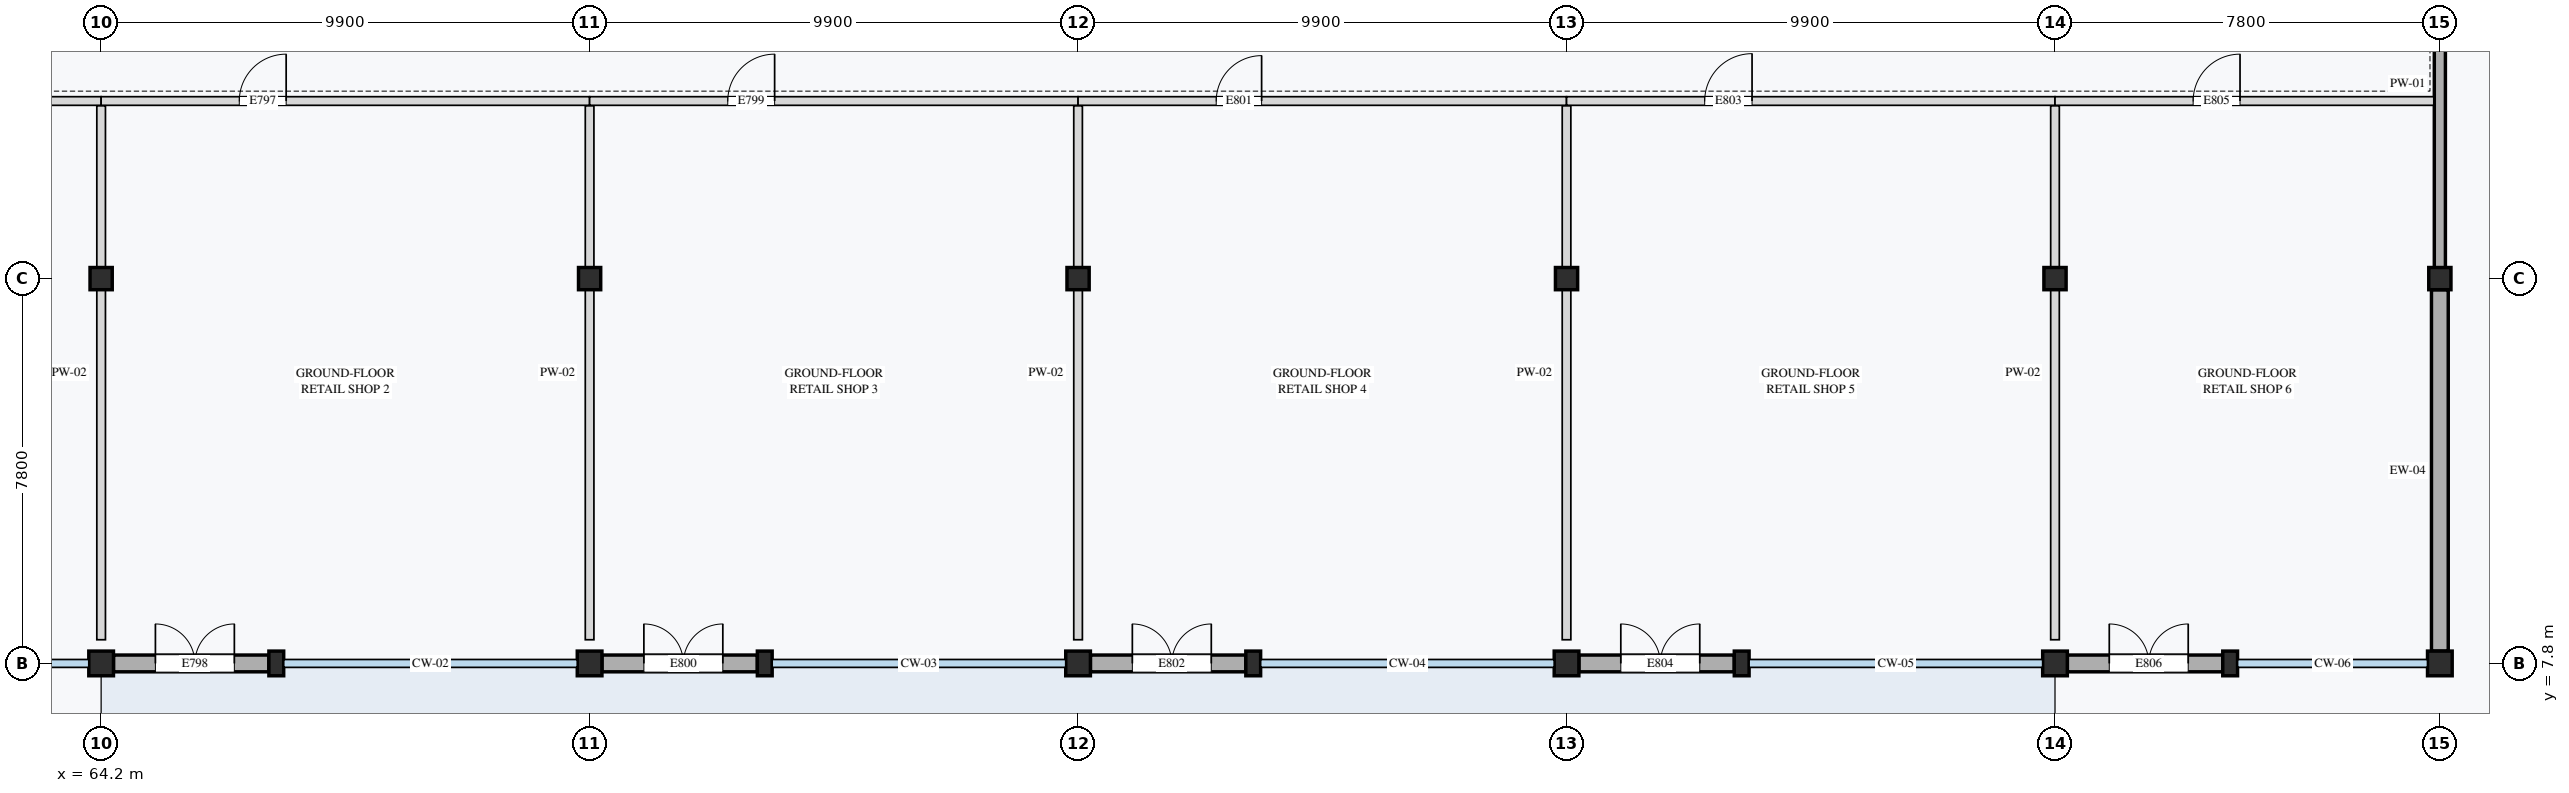
"""IFC4 building model, lengths in metres.
Left out: names, types, materials, properties, quantities, classifications, styles, units other than length and angle.
Written with IfcOpenShell. Run it as: python <this file> out.ifc"""

import sys

from ifc_helpers import new_model, si_unit, direction, frame, frame_2d, origin, origin_2d, place, context, subcontext, project, spatial, rectangle, circle, extrude, element, fill, save


model = new_model("IFC4")
c1 = context("Model", 3, precision=1e-05, world=origin(), true_north=direction((0.0, 1.0)))
c2 = subcontext(c1, "Body", "Model", "MODEL_VIEW")
j1 = project(units=[si_unit("LENGTHUNIT", "METRE"), si_unit("PLANEANGLEUNIT", "RADIAN")], contexts=[c1])
p1 = place(None, origin())
s1 = spatial("IfcSite", under=j1, at=p1, CompositionType="ELEMENT")
p2 = place(p1, origin())
s2 = spatial("IfcBuilding", under=s1, at=p2, CompositionType="ELEMENT")
p3 = place(p2, origin())
s3 = spatial("IfcBuildingStorey", under=s2, at=p3, CompositionType="ELEMENT", Elevation=0.0)
p4 = place(p3, frame((64.2, 7.8, 0.0), z_axis=(0.0, 0.0, 1.0), x_axis=(1.0, 0.0, 0.0)))
e1 = element("IfcColumn", 1, at=p4, inside=s3, PredefinedType="COLUMN", context=c2, shape_type="SweptSolid", body=[
    extrude(circle(Radius=0.25, at=origin_2d()), origin(), (0.0, 0.0, 1.0), 4.2),
])
p5 = place(p3, frame((64.2, 15.6, 0.0), z_axis=(0.0, 0.0, 1.0), x_axis=(1.0, 0.0, 0.0)))
e2 = element("IfcColumn", 2, at=p5, inside=s3, PredefinedType="COLUMN", context=c2, shape_type="SweptSolid", body=[
    extrude(rectangle(XDim=0.45, YDim=0.45, at=origin_2d()), origin(), (0.0, 0.0, 1.0), 4.2),
])
p6 = place(p3, frame((74.1, 7.8, 0.0), z_axis=(0.0, 0.0, 1.0), x_axis=(1.0, 0.0, 0.0)))
e3 = element("IfcColumn", 3, at=p6, inside=s3, PredefinedType="COLUMN", context=c2, shape_type="SweptSolid", body=[
    extrude(circle(Radius=0.25, at=origin_2d()), origin(), (0.0, 0.0, 1.0), 4.2),
])
p7 = place(p3, frame((74.1, 15.6, 0.0), z_axis=(0.0, 0.0, 1.0), x_axis=(1.0, 0.0, 0.0)))
e4 = element("IfcColumn", 4, at=p7, inside=s3, PredefinedType="COLUMN", context=c2, shape_type="SweptSolid", body=[
    extrude(rectangle(XDim=0.45, YDim=0.45, at=origin_2d()), origin(), (0.0, 0.0, 1.0), 4.2),
])
p8 = place(p3, frame((84.0, 7.8, 0.0), z_axis=(0.0, 0.0, 1.0), x_axis=(1.0, 0.0, 0.0)))
e5 = element("IfcColumn", 5, at=p8, inside=s3, PredefinedType="COLUMN", context=c2, shape_type="SweptSolid", body=[
    extrude(circle(Radius=0.25, at=origin_2d()), origin(), (0.0, 0.0, 1.0), 4.2),
])
p9 = place(p3, frame((84.0, 15.6, 0.0), z_axis=(0.0, 0.0, 1.0), x_axis=(1.0, 0.0, 0.0)))
e6 = element("IfcColumn", 6, at=p9, inside=s3, PredefinedType="COLUMN", context=c2, shape_type="SweptSolid", body=[
    extrude(rectangle(XDim=0.45, YDim=0.45, at=origin_2d()), origin(), (0.0, 0.0, 1.0), 4.2),
])
p10 = place(p3, frame((93.9, 7.8, 0.0), z_axis=(0.0, 0.0, 1.0), x_axis=(1.0, 0.0, 0.0)))
e7 = element("IfcColumn", 7, at=p10, inside=s3, PredefinedType="COLUMN", context=c2, shape_type="SweptSolid", body=[
    extrude(circle(Radius=0.25, at=origin_2d()), origin(), (0.0, 0.0, 1.0), 4.2),
])
p11 = place(p3, frame((93.9, 15.6, 0.0), z_axis=(0.0, 0.0, 1.0), x_axis=(1.0, 0.0, 0.0)))
e8 = element("IfcColumn", 8, at=p11, inside=s3, PredefinedType="COLUMN", context=c2, shape_type="SweptSolid", body=[
    extrude(rectangle(XDim=0.45, YDim=0.45, at=origin_2d()), origin(), (0.0, 0.0, 1.0), 4.2),
])
p12 = place(p3, frame((103.8, 7.8, 0.0), z_axis=(0.0, 0.0, 1.0), x_axis=(1.0, 0.0, 0.0)))
e9 = element("IfcColumn", 9, at=p12, inside=s3, PredefinedType="COLUMN", context=c2, shape_type="SweptSolid", body=[
    extrude(circle(Radius=0.25, at=origin_2d()), origin(), (0.0, 0.0, 1.0), 4.2),
])
p13 = place(p3, frame((103.8, 15.6, 0.0), z_axis=(0.0, 0.0, 1.0), x_axis=(1.0, 0.0, 0.0)))
e10 = element("IfcColumn", 10, at=p13, inside=s3, PredefinedType="COLUMN", context=c2, shape_type="SweptSolid", body=[
    extrude(rectangle(XDim=0.45, YDim=0.45, at=origin_2d()), origin(), (0.0, 0.0, 1.0), 4.2),
])
p14 = place(p3, frame((111.6, 7.8, 0.0), z_axis=(0.0, 0.0, 1.0), x_axis=(1.0, 0.0, 0.0)))
e11 = element("IfcColumn", 11, at=p14, inside=s3, PredefinedType="COLUMN", context=c2, shape_type="SweptSolid", body=[
    extrude(circle(Radius=0.25, at=origin_2d()), origin(), (0.0, 0.0, 1.0), 4.2),
])
p15 = place(p3, frame((111.6, 15.6, 0.0), z_axis=(0.0, 0.0, 1.0), x_axis=(1.0, 0.0, 0.0)))
e12 = element("IfcColumn", 12, at=p15, inside=s3, PredefinedType="COLUMN", context=c2, shape_type="SweptSolid", body=[
    extrude(rectangle(XDim=0.45, YDim=0.45, at=origin_2d()), origin(), (0.0, 0.0, 1.0), 4.2),
])
for number, where, z_axis, x_axis in (
    (13, (67.75, 7.8, 0.0), (0.0, 0.0, 1.0), (1.0, 0.0, 0.0)),
    (14, (77.65, 7.8, 0.0), (0.0, 0.0, 1.0), (1.0, 0.0, 0.0)),
    (15, (87.55, 7.8, 0.0), (0.0, 0.0, 1.0), (1.0, 0.0, 0.0)),
    (16, (97.45, 7.8, 0.0), (0.0, 0.0, 1.0), (1.0, 0.0, 0.0)),
    (17, (107.35, 7.8, 0.0), (0.0, 0.0, 1.0), (1.0, 0.0, 0.0)),
):
    element("IfcColumn", number, at=place(p3, frame(where, z_axis=z_axis, x_axis=x_axis)), inside=s3, PredefinedType="PILASTER", context=c2, shape_type="SweptSolid", body=[
        extrude(rectangle(XDim=0.3, YDim=0.5, at=origin_2d()), origin(), (0.0, 0.0, 1.0), 4.2),
    ])
p16 = place(p3, frame((64.45, 7.8, 0.0), z_axis=(0.0, 0.0, 1.0), x_axis=(1.0, 0.0, 0.0)))
e18 = element("IfcWall", 18, at=p16, inside=s3, PredefinedType="STANDARD", context=c2, shape_type="SweptSolid", body=[
    extrude(rectangle(XDim=3.15, YDim=0.34, at=frame_2d((1.575, 0.0))), origin(), (0.0, 0.0, 1.0), 3.55),
])
p17 = place(p16, frame((0.85, 0.0, 0.0)))
e19 = element("IfcOpeningElement", 19, at=p17, cuts=e18, PredefinedType="OPENING", context=c2, shape_type="SweptSolid", body=[
    extrude(rectangle(XDim=1.6, YDim=2.4, at=frame_2d((0.8, 1.2))), frame((0.0, 0.18, 0.0), z_axis=(0.0, -1.0, 0.0), x_axis=(1.0, 0.0, 0.0)), (0.0, 0.0, 1.0), 0.36),
])
p18 = place(p3, frame((74.35, 7.8, 0.0), z_axis=(0.0, 0.0, 1.0), x_axis=(1.0, 0.0, 0.0)))
e20 = element("IfcWall", 20, at=p18, inside=s3, PredefinedType="STANDARD", context=c2, shape_type="SweptSolid", body=[
    extrude(rectangle(XDim=3.15, YDim=0.34, at=frame_2d((1.575, 0.0))), origin(), (0.0, 0.0, 1.0), 3.55),
])
p19 = place(p18, frame((0.85, 0.0, 0.0)))
e21 = element("IfcOpeningElement", 21, at=p19, cuts=e20, PredefinedType="OPENING", context=c2, shape_type="SweptSolid", body=[
    extrude(rectangle(XDim=1.6, YDim=2.4, at=frame_2d((0.8, 1.2))), frame((0.0, 0.18, 0.0), z_axis=(0.0, -1.0, 0.0), x_axis=(1.0, 0.0, 0.0)), (0.0, 0.0, 1.0), 0.36),
])
p20 = place(p3, frame((84.25, 7.8, 0.0), z_axis=(0.0, 0.0, 1.0), x_axis=(1.0, 0.0, 0.0)))
e22 = element("IfcWall", 22, at=p20, inside=s3, PredefinedType="STANDARD", context=c2, shape_type="SweptSolid", body=[
    extrude(rectangle(XDim=3.15, YDim=0.34, at=frame_2d((1.575, 0.0))), origin(), (0.0, 0.0, 1.0), 3.55),
])
p21 = place(p20, frame((0.85, 0.0, 0.0)))
e23 = element("IfcOpeningElement", 23, at=p21, cuts=e22, PredefinedType="OPENING", context=c2, shape_type="SweptSolid", body=[
    extrude(rectangle(XDim=1.6, YDim=2.4, at=frame_2d((0.8, 1.2))), frame((0.0, 0.18, 0.0), z_axis=(0.0, -1.0, 0.0), x_axis=(1.0, 0.0, 0.0)), (0.0, 0.0, 1.0), 0.36),
])
p22 = place(p3, frame((94.15, 7.8, 0.0), z_axis=(0.0, 0.0, 1.0), x_axis=(1.0, 0.0, 0.0)))
e24 = element("IfcWall", 24, at=p22, inside=s3, PredefinedType="STANDARD", context=c2, shape_type="SweptSolid", body=[
    extrude(rectangle(XDim=3.15, YDim=0.34, at=frame_2d((1.575, 0.0))), origin(), (0.0, 0.0, 1.0), 3.55),
])
p23 = place(p22, frame((0.85, 0.0, 0.0)))
e25 = element("IfcOpeningElement", 25, at=p23, cuts=e24, PredefinedType="OPENING", context=c2, shape_type="SweptSolid", body=[
    extrude(rectangle(XDim=1.6, YDim=2.4, at=frame_2d((0.8, 1.2))), frame((0.0, 0.18, 0.0), z_axis=(0.0, -1.0, 0.0), x_axis=(1.0, 0.0, 0.0)), (0.0, 0.0, 1.0), 0.36),
])
p24 = place(p3, frame((104.05, 7.8, 0.0), z_axis=(0.0, 0.0, 1.0), x_axis=(1.0, 0.0, 0.0)))
e26 = element("IfcWall", 26, at=p24, inside=s3, PredefinedType="STANDARD", context=c2, shape_type="SweptSolid", body=[
    extrude(rectangle(XDim=3.15, YDim=0.34, at=frame_2d((1.575, 0.0))), origin(), (0.0, 0.0, 1.0), 3.55),
])
p25 = place(p24, frame((0.85, 0.0, 0.0)))
e27 = element("IfcOpeningElement", 27, at=p25, cuts=e26, PredefinedType="OPENING", context=c2, shape_type="SweptSolid", body=[
    extrude(rectangle(XDim=1.6, YDim=2.4, at=frame_2d((0.8, 1.2))), frame((0.0, 0.18, 0.0), z_axis=(0.0, -1.0, 0.0), x_axis=(1.0, 0.0, 0.0)), (0.0, 0.0, 1.0), 0.36),
])
p26 = place(p3, frame((111.6, 8.05, 0.0), z_axis=(0.0, 0.0, 1.0), x_axis=(0.0, 1.0, 0.0)))
e28 = element("IfcWall", 28, at=p26, inside=s3, PredefinedType="STANDARD", context=c2, shape_type="SweptSolid", body=[
    extrude(rectangle(XDim=7.325, YDim=0.34, at=frame_2d((3.663, 0.0))), origin(), (0.0, 0.0, 1.0), 3.5),
])
p27 = place(p3, frame((111.6, 15.387, 0.0), z_axis=(0.0, 0.0, 1.0), x_axis=(0.0, 1.0, 0.0)))
e29 = element("IfcWall", 29, at=p27, inside=s3, PredefinedType="STANDARD", context=c2, shape_type="SweptSolid", body=[
    extrude(rectangle(XDim=8.333, YDim=0.225, at=frame_2d((4.167, 0.0))), origin(), (0.0, 0.0, 1.0), 3.55),
])
p28 = place(p3, frame((56.522, 19.2, 0.0), z_axis=(0.0, 0.0, 1.0), x_axis=(1.0, 0.0, 0.0)))
e30 = element("IfcWall", 30, at=p28, inside=s3, PredefinedType="PARTITIONING", context=c2, shape_type="SweptSolid", body=[
    extrude(rectangle(XDim=7.677, YDim=0.175, at=frame_2d((3.839, 0.0))), origin(), (0.0, 0.0, 1.0), 3.92),
])
p29 = place(p28, frame((2.677, 0.0, 0.0)))
e31 = element("IfcOpeningElement", 31, at=p29, cuts=e30, PredefinedType="OPENING", context=c2, shape_type="SweptSolid", body=[
    extrude(rectangle(XDim=0.96, YDim=2.18, at=frame_2d((0.48, 1.09))), frame((0.0, 0.097, 0.0), z_axis=(0.0, -1.0, 0.0), x_axis=(1.0, 0.0, 0.0)), (0.0, 0.0, 1.0), 0.195),
])
p30 = place(p3, frame((64.2, 19.2, 0.0), z_axis=(0.0, 0.0, 1.0), x_axis=(1.0, 0.0, 0.0)))
e32 = element("IfcWall", 32, at=p30, inside=s3, PredefinedType="PARTITIONING", context=c2, shape_type="SweptSolid", body=[
    extrude(rectangle(XDim=9.9, YDim=0.175, at=frame_2d((4.95, 0.0))), origin(), (0.0, 0.0, 1.0), 3.92),
])
p31 = place(p30, frame((2.8, 0.0, 0.0)))
e33 = element("IfcOpeningElement", 33, at=p31, cuts=e32, PredefinedType="OPENING", context=c2, shape_type="SweptSolid", body=[
    extrude(rectangle(XDim=0.95, YDim=2.1, at=frame_2d((0.475, 1.05))), frame((0.0, 0.097, 0.0), z_axis=(0.0, -1.0, 0.0), x_axis=(1.0, 0.0, 0.0)), (0.0, 0.0, 1.0), 0.195),
])
p32 = place(p3, frame((64.2, 8.28, 0.0), z_axis=(0.0, 0.0, 1.0), x_axis=(0.0, 1.0, 0.0)))
e34 = element("IfcWall", 34, at=p32, inside=s3, PredefinedType="PARTITIONING", context=c2, shape_type="SweptSolid", body=[
    extrude(rectangle(XDim=10.823, YDim=0.175, at=frame_2d((5.411, 0.0))), origin(), (0.0, 0.0, 1.0), 3.5),
])
p33 = place(p3, frame((74.1, 19.2, 0.0), z_axis=(0.0, 0.0, 1.0), x_axis=(1.0, 0.0, 0.0)))
e35 = element("IfcWall", 35, at=p33, inside=s3, PredefinedType="PARTITIONING", context=c2, shape_type="SweptSolid", body=[
    extrude(rectangle(XDim=9.9, YDim=0.175, at=frame_2d((4.95, 0.0))), origin(), (0.0, 0.0, 1.0), 3.92),
])
p34 = place(p33, frame((2.8, 0.0, 0.0)))
e36 = element("IfcOpeningElement", 36, at=p34, cuts=e35, PredefinedType="OPENING", context=c2, shape_type="SweptSolid", body=[
    extrude(rectangle(XDim=0.95, YDim=2.16, at=frame_2d((0.475, 1.08))), frame((0.0, 0.097, 0.0), z_axis=(0.0, -1.0, 0.0), x_axis=(1.0, 0.0, 0.0)), (0.0, 0.0, 1.0), 0.195),
])
p35 = place(p3, frame((74.1, 8.28, 0.0), z_axis=(0.0, 0.0, 1.0), x_axis=(0.0, 1.0, 0.0)))
e37 = element("IfcWall", 37, at=p35, inside=s3, PredefinedType="PARTITIONING", context=c2, shape_type="SweptSolid", body=[
    extrude(rectangle(XDim=10.823, YDim=0.175, at=frame_2d((5.411, 0.0))), origin(), (0.0, 0.0, 1.0), 3.92),
])
p36 = place(p3, frame((84.0, 19.2, 0.0), z_axis=(0.0, 0.0, 1.0), x_axis=(1.0, 0.0, 0.0)))
e38 = element("IfcWall", 38, at=p36, inside=s3, PredefinedType="PARTITIONING", context=c2, shape_type="SweptSolid", body=[
    extrude(rectangle(XDim=9.9, YDim=0.175, at=frame_2d((4.95, 0.0))), origin(), (0.0, 0.0, 1.0), 3.92),
])
p37 = place(p36, frame((2.8, 0.0, 0.0)))
e39 = element("IfcOpeningElement", 39, at=p37, cuts=e38, PredefinedType="OPENING", context=c2, shape_type="SweptSolid", body=[
    extrude(rectangle(XDim=0.92, YDim=2.14, at=frame_2d((0.46, 1.07))), frame((0.0, 0.097, 0.0), z_axis=(0.0, -1.0, 0.0), x_axis=(1.0, 0.0, 0.0)), (0.0, 0.0, 1.0), 0.195),
])
p38 = place(p3, frame((84.0, 8.28, 0.0), z_axis=(0.0, 0.0, 1.0), x_axis=(0.0, 1.0, 0.0)))
e40 = element("IfcWall", 40, at=p38, inside=s3, PredefinedType="PARTITIONING", context=c2, shape_type="SweptSolid", body=[
    extrude(rectangle(XDim=10.823, YDim=0.175, at=frame_2d((5.411, 0.0))), origin(), (0.0, 0.0, 1.0), 3.5),
])
p39 = place(p3, frame((93.9, 19.2, 0.0), z_axis=(0.0, 0.0, 1.0), x_axis=(1.0, 0.0, 0.0)))
e41 = element("IfcWall", 41, at=p39, inside=s3, PredefinedType="PARTITIONING", context=c2, shape_type="SweptSolid", body=[
    extrude(rectangle(XDim=9.9, YDim=0.175, at=frame_2d((4.95, 0.0))), origin(), (0.0, 0.0, 1.0), 3.92),
])
p40 = place(p39, frame((2.8, 0.0, 0.0)))
e42 = element("IfcOpeningElement", 42, at=p40, cuts=e41, PredefinedType="OPENING", context=c2, shape_type="SweptSolid", body=[
    extrude(rectangle(XDim=0.96, YDim=2.18, at=frame_2d((0.48, 1.09))), frame((0.0, 0.097, 0.0), z_axis=(0.0, -1.0, 0.0), x_axis=(1.0, 0.0, 0.0)), (0.0, 0.0, 1.0), 0.195),
])
p41 = place(p3, frame((93.9, 8.28, 0.0), z_axis=(0.0, 0.0, 1.0), x_axis=(0.0, 1.0, 0.0)))
e43 = element("IfcWall", 43, at=p41, inside=s3, PredefinedType="PARTITIONING", context=c2, shape_type="SweptSolid", body=[
    extrude(rectangle(XDim=10.823, YDim=0.175, at=frame_2d((5.411, 0.0))), origin(), (0.0, 0.0, 1.0), 3.92),
])
p42 = place(p3, frame((103.8, 19.2, 0.0), z_axis=(0.0, 0.0, 1.0), x_axis=(1.0, 0.0, 0.0)))
e44 = element("IfcWall", 44, at=p42, inside=s3, PredefinedType="PARTITIONING", context=c2, shape_type="SweptSolid", body=[
    extrude(rectangle(XDim=7.677, YDim=0.175, at=frame_2d((3.839, 0.0))), origin(), (0.0, 0.0, 1.0), 3.92),
])
p43 = place(p42, frame((2.8, 0.0, 0.0)))
e45 = element("IfcOpeningElement", 45, at=p43, cuts=e44, PredefinedType="OPENING", context=c2, shape_type="SweptSolid", body=[
    extrude(rectangle(XDim=0.95, YDim=2.1, at=frame_2d((0.475, 1.05))), frame((0.0, 0.097, 0.0), z_axis=(0.0, -1.0, 0.0), x_axis=(1.0, 0.0, 0.0)), (0.0, 0.0, 1.0), 0.195),
])
p44 = place(p3, frame((103.8, 8.28, 0.0), z_axis=(0.0, 0.0, 1.0), x_axis=(0.0, 1.0, 0.0)))
e46 = element("IfcWall", 46, at=p44, inside=s3, PredefinedType="PARTITIONING", context=c2, shape_type="SweptSolid", body=[
    extrude(rectangle(XDim=10.823, YDim=0.175, at=frame_2d((5.411, 0.0))), origin(), (0.0, 0.0, 1.0), 3.5),
])
p45 = place(p17, origin())
e47 = element("IfcDoor", 47, at=p45, inside=s3, OperationType="DOUBLE_DOOR_SINGLE_SWING", PredefinedType="DOOR", context=c2, shape_type="SweptSolid", body=[
    extrude(rectangle(XDim=1.6, YDim=2.4, at=frame_2d((0.8, 1.2))), frame((0.0, 0.025, 0.0), z_axis=(0.0, -1.0, 0.0), x_axis=(1.0, 0.0, 0.0)), (0.0, 0.0, 1.0), 0.05),
])
fill(e19, e47)
p46 = place(p19, origin())
e48 = element("IfcDoor", 48, at=p46, inside=s3, OperationType="DOUBLE_DOOR_SINGLE_SWING", PredefinedType="DOOR", context=c2, shape_type="SweptSolid", body=[
    extrude(rectangle(XDim=1.6, YDim=2.4, at=frame_2d((0.8, 1.2))), frame((0.0, 0.025, 0.0), z_axis=(0.0, -1.0, 0.0), x_axis=(1.0, 0.0, 0.0)), (0.0, 0.0, 1.0), 0.05),
])
fill(e21, e48)
p47 = place(p21, origin())
e49 = element("IfcDoor", 49, at=p47, inside=s3, OperationType="DOUBLE_DOOR_SINGLE_SWING", PredefinedType="DOOR", context=c2, shape_type="SweptSolid", body=[
    extrude(rectangle(XDim=1.6, YDim=2.4, at=frame_2d((0.8, 1.2))), frame((0.0, 0.025, 0.0), z_axis=(0.0, -1.0, 0.0), x_axis=(1.0, 0.0, 0.0)), (0.0, 0.0, 1.0), 0.05),
])
fill(e23, e49)
p48 = place(p23, origin())
e50 = element("IfcDoor", 50, at=p48, inside=s3, OperationType="DOUBLE_DOOR_SINGLE_SWING", PredefinedType="DOOR", context=c2, shape_type="SweptSolid", body=[
    extrude(rectangle(XDim=1.6, YDim=2.4, at=frame_2d((0.8, 1.2))), frame((0.0, 0.025, 0.0), z_axis=(0.0, -1.0, 0.0), x_axis=(1.0, 0.0, 0.0)), (0.0, 0.0, 1.0), 0.05),
])
fill(e25, e50)
p49 = place(p25, origin())
e51 = element("IfcDoor", 51, at=p49, inside=s3, OperationType="DOUBLE_DOOR_SINGLE_SWING", PredefinedType="DOOR", context=c2, shape_type="SweptSolid", body=[
    extrude(rectangle(XDim=1.6, YDim=2.4, at=frame_2d((0.8, 1.2))), frame((0.0, 0.025, 0.0), z_axis=(0.0, -1.0, 0.0), x_axis=(1.0, 0.0, 0.0)), (0.0, 0.0, 1.0), 0.05),
])
fill(e27, e51)
p50 = place(p31, origin())
e52 = element("IfcDoor", 52, at=p50, inside=s3, OperationType="SINGLE_SWING_RIGHT", PredefinedType="DOOR", context=c2, shape_type="SweptSolid", body=[
    extrude(rectangle(XDim=0.95, YDim=2.1, at=frame_2d((0.475, 1.05))), frame((0.0, 0.025, 0.0), z_axis=(0.0, -1.0, 0.0), x_axis=(1.0, 0.0, 0.0)), (0.0, 0.0, 1.0), 0.05),
])
fill(e33, e52)
p51 = place(p34, origin())
e53 = element("IfcDoor", 53, at=p51, inside=s3, OperationType="SINGLE_SWING_RIGHT", PredefinedType="DOOR", context=c2, shape_type="SweptSolid", body=[
    extrude(rectangle(XDim=0.95, YDim=2.16, at=frame_2d((0.475, 1.08))), frame((0.0, 0.025, 0.0), z_axis=(0.0, -1.0, 0.0), x_axis=(1.0, 0.0, 0.0)), (0.0, 0.0, 1.0), 0.05),
])
fill(e36, e53)
p52 = place(p37, origin())
e54 = element("IfcDoor", 54, at=p52, inside=s3, OperationType="SINGLE_SWING_RIGHT", PredefinedType="DOOR", context=c2, shape_type="SweptSolid", body=[
    extrude(rectangle(XDim=0.92, YDim=2.14, at=frame_2d((0.46, 1.07))), frame((0.0, 0.025, 0.0), z_axis=(0.0, -1.0, 0.0), x_axis=(1.0, 0.0, 0.0)), (0.0, 0.0, 1.0), 0.05),
])
fill(e39, e54)
p53 = place(p40, origin())
e55 = element("IfcDoor", 55, at=p53, inside=s3, OperationType="SINGLE_SWING_RIGHT", PredefinedType="DOOR", context=c2, shape_type="SweptSolid", body=[
    extrude(rectangle(XDim=0.96, YDim=2.18, at=frame_2d((0.48, 1.09))), frame((0.0, 0.025, 0.0), z_axis=(0.0, -1.0, 0.0), x_axis=(1.0, 0.0, 0.0)), (0.0, 0.0, 1.0), 0.05),
])
fill(e42, e55)
p54 = place(p43, origin())
e56 = element("IfcDoor", 56, at=p54, inside=s3, OperationType="SINGLE_SWING_RIGHT", PredefinedType="DOOR", context=c2, shape_type="SweptSolid", body=[
    extrude(rectangle(XDim=0.95, YDim=2.1, at=frame_2d((0.475, 1.05))), frame((0.0, 0.025, 0.0), z_axis=(0.0, -1.0, 0.0), x_axis=(1.0, 0.0, 0.0)), (0.0, 0.0, 1.0), 0.05),
])
fill(e45, e56)
save(model, sys.argv[1])
